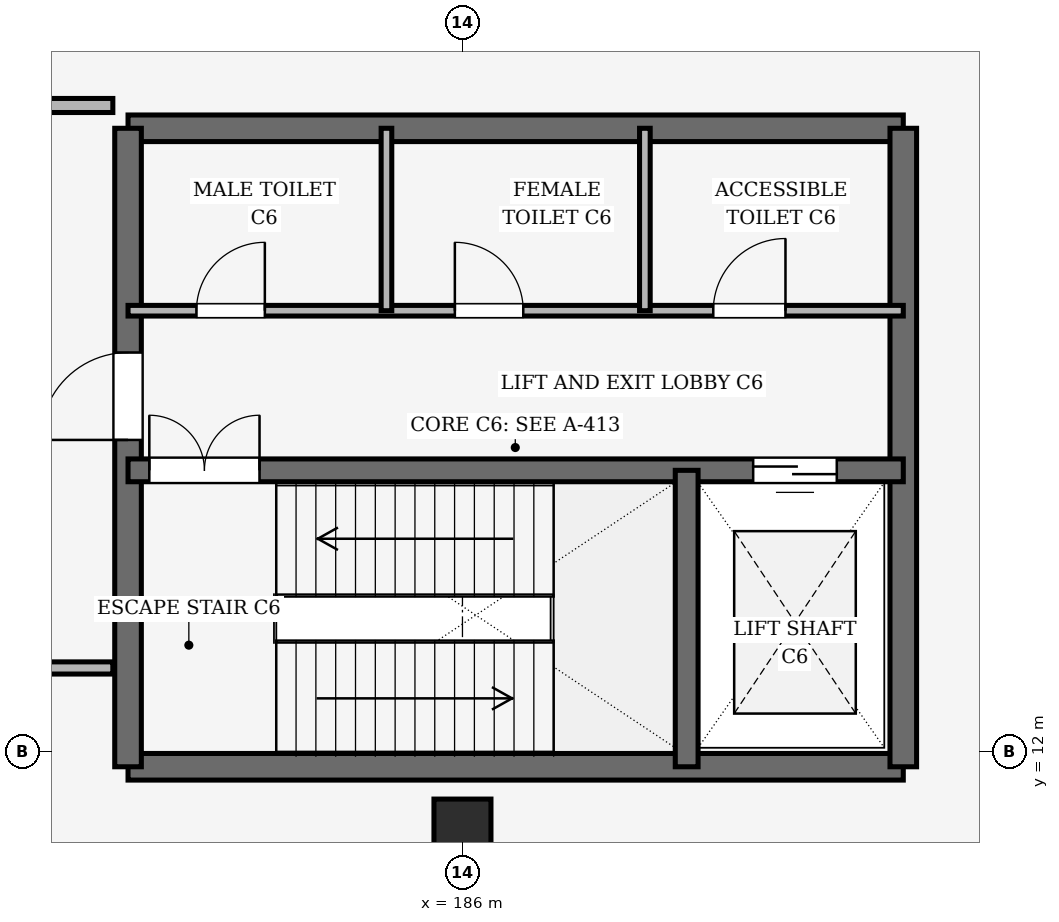
"""IFC4 building model, lengths in metres.
Left out: names, types, materials, properties, quantities, classifications, styles, units other than length and angle.
Written with IfcOpenShell. Run it as: python <this file> out.ifc"""

import sys

from ifc_helpers import new_model, si_unit, direction, frame, frame_2d, origin, origin_2d, place, context, subcontext, project, spatial, rectangle, extrude, element, fill, save


model = new_model("IFC4")
c1 = context("Model", 3, precision=1e-05, world=origin(), true_north=direction((0.0, 1.0)))
c2 = subcontext(c1, "Body", "Model", "MODEL_VIEW")
j1 = project(units=[si_unit("LENGTHUNIT", "METRE"), si_unit("PLANEANGLEUNIT", "RADIAN")], contexts=[c1])
p1 = place(None, origin())
s1 = spatial("IfcSite", under=j1, at=p1, CompositionType="ELEMENT")
p2 = place(p1, origin())
s2 = spatial("IfcBuilding", under=s1, at=p2, CompositionType="ELEMENT")
p3 = place(p2, origin())
s3 = spatial("IfcBuildingStorey", under=s2, at=p3, CompositionType="ELEMENT", Elevation=0.0)
p4 = place(p3, frame((186.0, 11.0, 0.0), z_axis=(0.0, 0.0, 1.0), x_axis=(1.0, 0.0, 0.0)))
e1 = element("IfcColumn", 1, at=p4, inside=s3, PredefinedType="COLUMN", context=c2, shape_type="SweptSolid", body=[
    extrude(rectangle(XDim=0.75, YDim=0.75, at=origin_2d()), origin(), (0.0, 0.0, 1.0), 5.4),
])
for number, where, z_axis, x_axis in (
    (2, (181.6, 11.8, 0.0), (0.0, 0.0, 1.0), (1.0, 0.0, 0.0)),
    (3, (191.8, 20.2, 0.0), (0.0, 0.0, 1.0), (-1.0, 0.0, 0.0)),
):
    element("IfcWall", number, at=place(p3, frame(where, z_axis=z_axis, x_axis=x_axis)), inside=s3, PredefinedType="SHEAR", context=c2, shape_type="SweptSolid", body=[
        extrude(rectangle(XDim=10.2, YDim=0.35, at=frame_2d((5.1, 0.0))), origin(), (0.0, 0.0, 1.0), 5.4),
    ])
p5 = place(p3, frame((181.6, 20.2, 0.0), z_axis=(0.0, 0.0, 1.0), x_axis=(0.0, -1.0, 0.0)))
e4 = element("IfcWall", 4, at=p5, inside=s3, PredefinedType="SHEAR", context=c2, shape_type="SweptSolid", body=[
    extrude(rectangle(XDim=8.4, YDim=0.35, at=frame_2d((4.2, 0.0))), origin(), (0.0, 0.0, 1.0), 5.4),
])
p6 = place(p5, frame((2.95, 0.0, 0.0)))
e5 = element("IfcOpeningElement", 5, at=p6, cuts=e4, PredefinedType="OPENING", context=c2, shape_type="SweptSolid", body=[
    extrude(rectangle(XDim=1.15, YDim=2.15, at=frame_2d((0.575, 1.075))), frame((0.0, 0.185, 0.0), z_axis=(0.0, -1.0, 0.0), x_axis=(1.0, 0.0, 0.0)), (0.0, 0.0, 1.0), 0.37),
])
p7 = place(p3, frame((191.8, 11.8, 0.0), z_axis=(0.0, 0.0, 1.0), x_axis=(0.0, 1.0, 0.0)))
e6 = element("IfcWall", 6, at=p7, inside=s3, PredefinedType="SHEAR", context=c2, shape_type="SweptSolid", body=[
    extrude(rectangle(XDim=8.4, YDim=0.35, at=frame_2d((4.2, 0.0))), origin(), (0.0, 0.0, 1.0), 5.4),
])
p8 = place(p3, frame((181.6, 15.7, 0.0), z_axis=(0.0, 0.0, 1.0), x_axis=(1.0, 0.0, 0.0)))
e7 = element("IfcWall", 7, at=p8, inside=s3, PredefinedType="SHEAR", context=c2, shape_type="SweptSolid", body=[
    extrude(rectangle(XDim=10.2, YDim=0.3, at=frame_2d((5.1, 0.0))), origin(), (0.0, 0.0, 1.0), 5.4),
])
p9 = place(p8, frame((0.28, 0.0, 0.0)))
e8 = element("IfcOpeningElement", 8, at=p9, cuts=e7, PredefinedType="OPENING", context=c2, shape_type="SweptSolid", body=[
    extrude(rectangle(XDim=1.45, YDim=2.15, at=frame_2d((0.725, 1.075))), frame((0.0, 0.16, 0.0), z_axis=(0.0, -1.0, 0.0), x_axis=(1.0, 0.0, 0.0)), (0.0, 0.0, 1.0), 0.32),
])
p10 = place(p8, frame((8.225, 0.0, 0.0)))
e9 = element("IfcOpeningElement", 9, at=p10, cuts=e7, PredefinedType="OPENING", context=c2, shape_type="SweptSolid", body=[
    extrude(rectangle(XDim=1.1, YDim=2.15, at=frame_2d((0.55, 1.075))), frame((0.0, 0.16, 0.0), z_axis=(0.0, -1.0, 0.0), x_axis=(1.0, 0.0, 0.0)), (0.0, 0.0, 1.0), 0.32),
])
p11 = place(p3, frame((188.95, 11.8, 0.0), z_axis=(0.0, 0.0, 1.0), x_axis=(0.0, 1.0, 0.0)))
e10 = element("IfcWall", 10, at=p11, inside=s3, PredefinedType="SHEAR", context=c2, shape_type="SweptSolid", body=[
    extrude(rectangle(XDim=3.9, YDim=0.3, at=frame_2d((1.95, 0.0))), origin(), (0.0, 0.0, 1.0), 5.4),
])
p12 = place(p3, frame((181.6, 17.8, 0.0), z_axis=(0.0, 0.0, 1.0), x_axis=(1.0, 0.0, 0.0)))
e11 = element("IfcWall", 11, at=p12, inside=s3, PredefinedType="PARTITIONING", context=c2, shape_type="SweptSolid", body=[
    extrude(rectangle(XDim=10.2, YDim=0.14, at=frame_2d((5.1, 0.0))), origin(), (0.0, 0.0, 1.0), 4.325),
])
p13 = place(p12, frame((0.9, 0.0, 0.0)))
e12 = element("IfcOpeningElement", 12, at=p13, cuts=e11, PredefinedType="OPENING", context=c2, shape_type="SweptSolid", body=[
    extrude(rectangle(XDim=0.9, YDim=2.1, at=frame_2d((0.45, 1.05))), frame((0.0, 0.08, 0.0), z_axis=(0.0, -1.0, 0.0), x_axis=(1.0, 0.0, 0.0)), (0.0, 0.0, 1.0), 0.16),
])
p14 = place(p12, frame((4.3, 0.0, 0.0)))
e13 = element("IfcOpeningElement", 13, at=p14, cuts=e11, PredefinedType="OPENING", context=c2, shape_type="SweptSolid", body=[
    extrude(rectangle(XDim=0.9, YDim=2.1, at=frame_2d((0.45, 1.05))), frame((0.0, 0.08, 0.0), z_axis=(0.0, -1.0, 0.0), x_axis=(1.0, 0.0, 0.0)), (0.0, 0.0, 1.0), 0.16),
])
p15 = place(p12, frame((7.7, 0.0, 0.0)))
e14 = element("IfcOpeningElement", 14, at=p15, cuts=e11, PredefinedType="OPENING", context=c2, shape_type="SweptSolid", body=[
    extrude(rectangle(XDim=0.95, YDim=2.1, at=frame_2d((0.475, 1.05))), frame((0.0, 0.08, 0.0), z_axis=(0.0, -1.0, 0.0), x_axis=(1.0, 0.0, 0.0)), (0.0, 0.0, 1.0), 0.16),
])
for number, where, z_axis, x_axis in (
    (15, (185.0, 17.8, 0.0), (0.0, 0.0, 1.0), (0.0, 1.0, 0.0)),
    (16, (188.4, 17.8, 0.0), (0.0, 0.0, 1.0), (0.0, 1.0, 0.0)),
):
    element("IfcWall", number, at=place(p3, frame(where, z_axis=z_axis, x_axis=x_axis)), inside=s3, PredefinedType="PARTITIONING", context=c2, shape_type="SweptSolid", body=[
        extrude(rectangle(XDim=2.4, YDim=0.14, at=frame_2d((1.2, 0.0))), origin(), (0.0, 0.0, 1.0), 4.5),
    ])
p16 = place(p3, frame((137.8, 20.5, 0.0), z_axis=(0.0, 0.0, 1.0), x_axis=(1.0, 0.0, 0.0)))
e17 = element("IfcWall", 17, at=p16, inside=s3, PredefinedType="PARTITIONING", context=c2, shape_type="SweptSolid", body=[
    extrude(rectangle(XDim=43.6, YDim=0.185, at=frame_2d((21.8, 0.0))), origin(), (0.0, 0.0, 1.0), 3.6),
])
p17 = place(p16, frame((5.7, 0.0, 0.0)))
e18 = element("IfcOpeningElement", 18, at=p17, cuts=e17, PredefinedType="OPENING", context=c2, shape_type="SweptSolid", body=[
    extrude(rectangle(XDim=1.6, YDim=2.2, at=frame_2d((0.8, 1.1))), frame((0.0, 0.103, 0.0), z_axis=(0.0, -1.0, 0.0), x_axis=(1.0, 0.0, 0.0)), (0.0, 0.0, 1.0), 0.205),
])
p18 = place(p16, frame((28.7, 0.0, 0.0)))
e19 = element("IfcOpeningElement", 19, at=p18, cuts=e17, PredefinedType="OPENING", context=c2, shape_type="SweptSolid", body=[
    extrude(rectangle(XDim=1.6, YDim=2.2, at=frame_2d((0.8, 1.1))), frame((0.0, 0.103, 0.0), z_axis=(0.0, -1.0, 0.0), x_axis=(1.0, 0.0, 0.0)), (0.0, 0.0, 1.0), 0.205),
])
p19 = place(p16, frame((39.7, 0.0, 0.0)))
e20 = element("IfcOpeningElement", 20, at=p19, cuts=e17, PredefinedType="OPENING", context=c2, shape_type="SweptSolid", body=[
    extrude(rectangle(XDim=1.6, YDim=2.2, at=frame_2d((0.8, 1.1))), frame((0.0, 0.103, 0.0), z_axis=(0.0, -1.0, 0.0), x_axis=(1.0, 0.0, 0.0)), (0.0, 0.0, 1.0), 0.205),
])
p20 = place(p16, frame((16.7, 0.0, 0.0)))
e21 = element("IfcOpeningElement", 21, at=p20, cuts=e17, PredefinedType="OPENING", context=c2, shape_type="SweptSolid", body=[
    extrude(rectangle(XDim=1.6, YDim=2.2, at=frame_2d((0.8, 1.1))), frame((0.0, 0.103, 0.0), z_axis=(0.0, -1.0, 0.0), x_axis=(1.0, 0.0, 0.0)), (0.0, 0.0, 1.0), 0.205),
])
p21 = place(p3, frame((137.8, 13.1, 0.0), z_axis=(0.0, 0.0, 1.0), x_axis=(1.0, 0.0, 0.0)))
e22 = element("IfcWall", 22, at=p21, inside=s3, PredefinedType="PARTITIONING", context=c2, shape_type="SweptSolid", body=[
    extrude(rectangle(XDim=43.6, YDim=0.16, at=frame_2d((21.8, 0.0))), origin(), (0.0, 0.0, 1.0), 3.6),
])
p22 = place(p21, frame((8.0, 0.0, 0.0)))
e23 = element("IfcOpeningElement", 23, at=p22, cuts=e22, PredefinedType="OPENING", context=c2, shape_type="SweptSolid", body=[
    extrude(rectangle(XDim=1.6, YDim=2.2, at=frame_2d((0.8, 1.1))), frame((0.0, 0.09, 0.0), z_axis=(0.0, -1.0, 0.0), x_axis=(1.0, 0.0, 0.0)), (0.0, 0.0, 1.0), 0.18),
])
p23 = place(p21, frame((30.0, 0.0, 0.0)))
e24 = element("IfcOpeningElement", 24, at=p23, cuts=e22, PredefinedType="OPENING", context=c2, shape_type="SweptSolid", body=[
    extrude(rectangle(XDim=1.6, YDim=2.2, at=frame_2d((0.8, 1.1))), frame((0.0, 0.09, 0.0), z_axis=(0.0, -1.0, 0.0), x_axis=(1.0, 0.0, 0.0)), (0.0, 0.0, 1.0), 0.18),
])
p24 = place(p6, frame((1.15, 0.0, 0.0), z_axis=(0.0, 0.0, 1.0), x_axis=(-1.0, 0.0, 0.0)))
e25 = element("IfcDoor", 25, at=p24, inside=s3, OperationType="SINGLE_SWING_LEFT", PredefinedType="DOOR", context=c2, shape_type="SweptSolid", body=[
    extrude(rectangle(XDim=1.15, YDim=2.15, at=frame_2d((0.575, 1.075))), frame((0.0, 0.025, 0.0), z_axis=(0.0, -1.0, 0.0), x_axis=(1.0, 0.0, 0.0)), (0.0, 0.0, 1.0), 0.05),
])
fill(e5, e25)
p25 = place(p9, origin())
e26 = element("IfcDoor", 26, at=p25, inside=s3, OperationType="DOUBLE_DOOR_SINGLE_SWING", PredefinedType="DOOR", context=c2, shape_type="SweptSolid", body=[
    extrude(rectangle(XDim=1.45, YDim=2.15, at=frame_2d((0.725, 1.075))), frame((0.0, 0.025, 0.0), z_axis=(0.0, -1.0, 0.0), x_axis=(1.0, 0.0, 0.0)), (0.0, 0.0, 1.0), 0.05),
])
fill(e8, e26)
p26 = place(p10, origin())
e27 = element("IfcDoor", 27, at=p26, inside=s3, OperationType="DOUBLE_DOOR_SLIDING", PredefinedType="DOOR", context=c2, shape_type="SweptSolid", body=[
    extrude(rectangle(XDim=1.1, YDim=2.15, at=frame_2d((0.55, 1.075))), frame((0.0, 0.025, 0.0), z_axis=(0.0, -1.0, 0.0), x_axis=(1.0, 0.0, 0.0)), (0.0, 0.0, 1.0), 0.05),
])
fill(e9, e27)
p27 = place(p13, origin())
e28 = element("IfcDoor", 28, at=p27, inside=s3, OperationType="SINGLE_SWING_RIGHT", PredefinedType="DOOR", context=c2, shape_type="SweptSolid", body=[
    extrude(rectangle(XDim=0.9, YDim=2.1, at=frame_2d((0.45, 1.05))), frame((0.0, 0.025, 0.0), z_axis=(0.0, -1.0, 0.0), x_axis=(1.0, 0.0, 0.0)), (0.0, 0.0, 1.0), 0.05),
])
fill(e12, e28)
p28 = place(p14, origin())
e29 = element("IfcDoor", 29, at=p28, inside=s3, OperationType="SINGLE_SWING_LEFT", PredefinedType="DOOR", context=c2, shape_type="SweptSolid", body=[
    extrude(rectangle(XDim=0.9, YDim=2.1, at=frame_2d((0.45, 1.05))), frame((0.0, 0.025, 0.0), z_axis=(0.0, -1.0, 0.0), x_axis=(1.0, 0.0, 0.0)), (0.0, 0.0, 1.0), 0.05),
])
fill(e13, e29)
p29 = place(p15, origin())
e30 = element("IfcDoor", 30, at=p29, inside=s3, OperationType="SINGLE_SWING_RIGHT", PredefinedType="DOOR", context=c2, shape_type="SweptSolid", body=[
    extrude(rectangle(XDim=0.95, YDim=2.1, at=frame_2d((0.475, 1.05))), frame((0.0, 0.025, 0.0), z_axis=(0.0, -1.0, 0.0), x_axis=(1.0, 0.0, 0.0)), (0.0, 0.0, 1.0), 0.05),
])
fill(e14, e30)
save(model, sys.argv[1])
